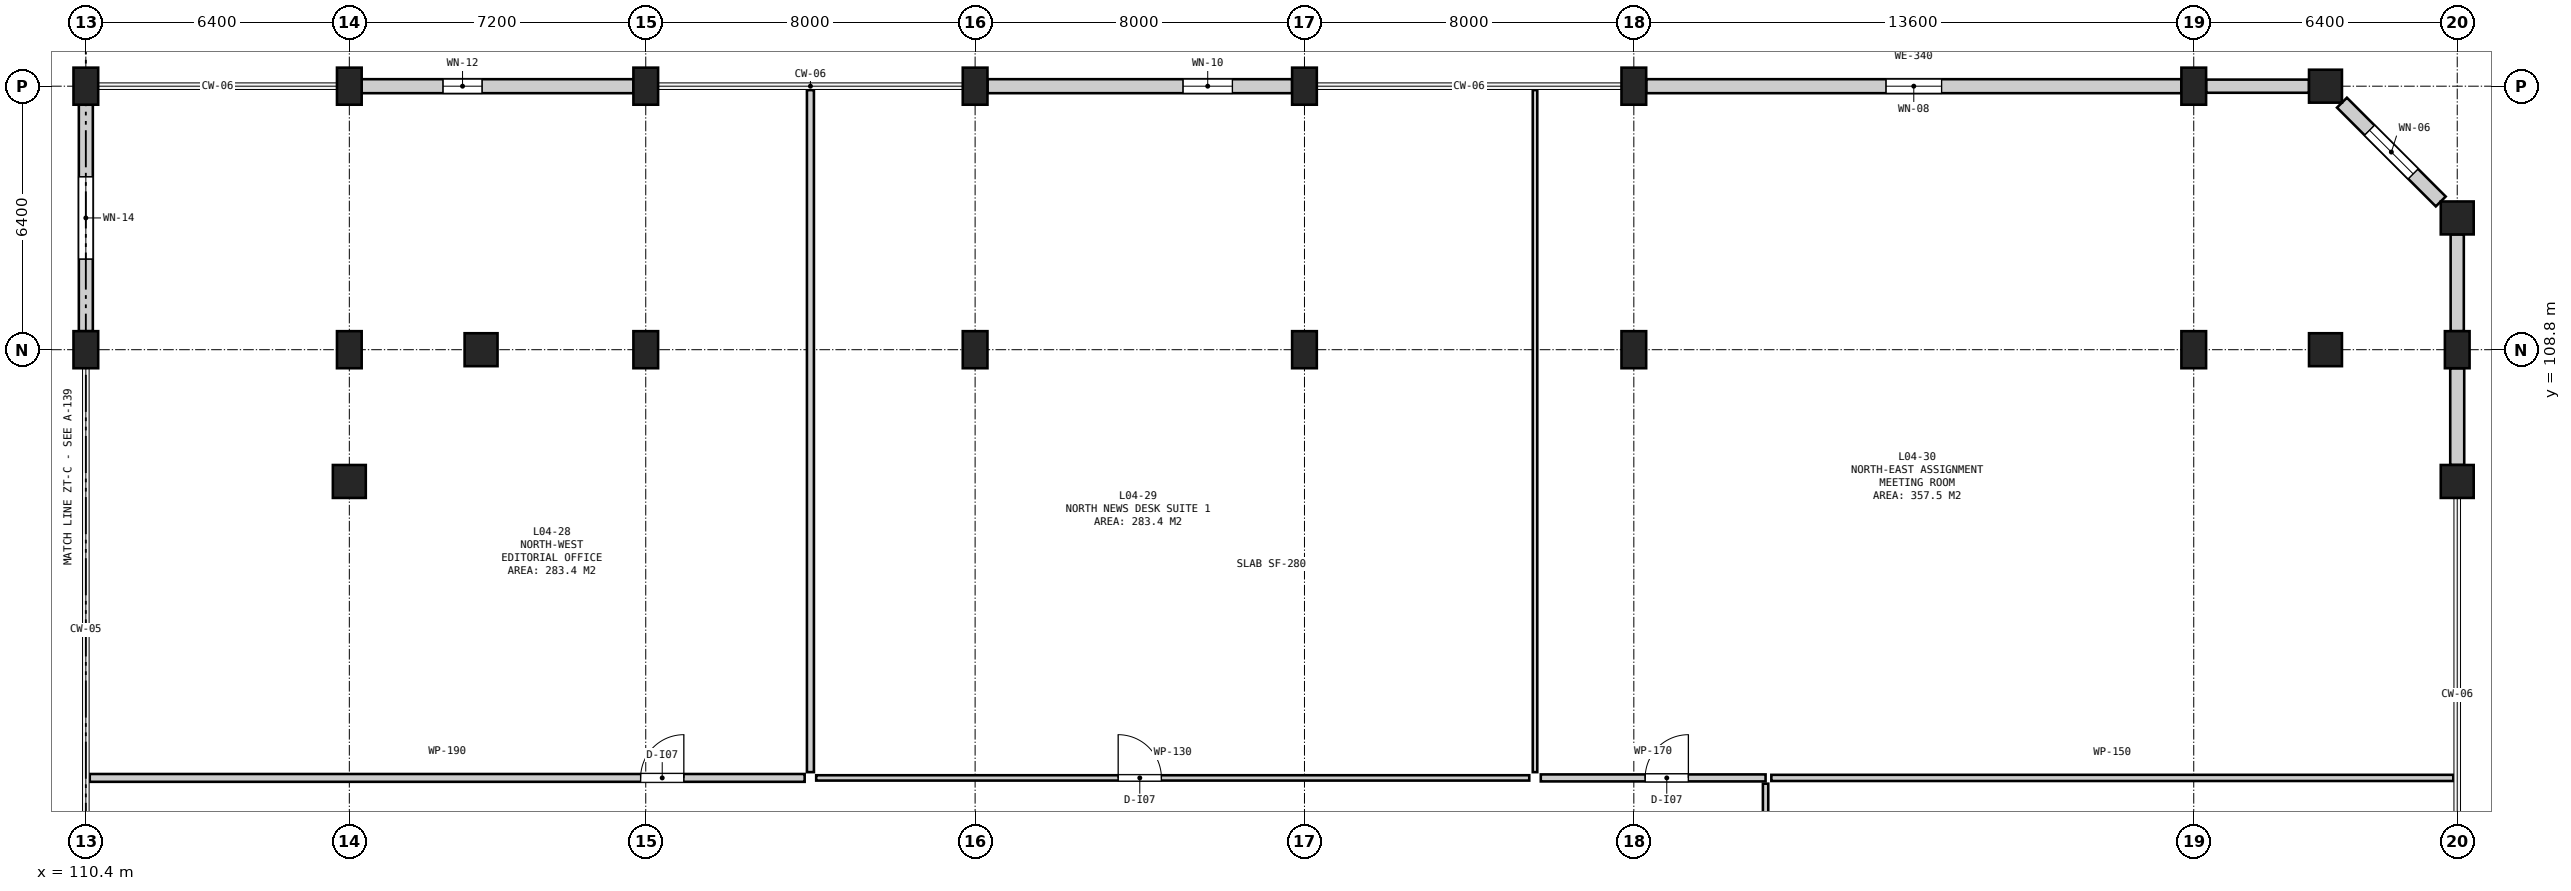
"""IFC4 building model, lengths in metres.
Left out: names, types, materials, properties, quantities, classifications, styles, units other than length and angle.
Written with IfcOpenShell. Run it as: python <this file> out.ifc"""

import sys

from ifc_helpers import new_model, si_unit, direction, frame, frame_2d, origin, origin_2d, place, context, subcontext, project, spatial, rectangle, circle, extrude, element, fill, save


model = new_model("IFC4")
c1 = context("Model", 3, precision=1e-05, world=origin(), true_north=direction((0.0, 1.0)))
c2 = subcontext(c1, "Body", "Model", "MODEL_VIEW")
j1 = project(units=[si_unit("LENGTHUNIT", "METRE"), si_unit("PLANEANGLEUNIT", "RADIAN")], contexts=[c1])
p1 = place(None, origin())
s1 = spatial("IfcSite", under=j1, at=p1, CompositionType="ELEMENT")
p2 = place(p1, origin())
s2 = spatial("IfcBuilding", under=s1, at=p2, CompositionType="ELEMENT")
p3 = place(p2, frame((0.0, 0.0, 19.8)))
s3 = spatial("IfcBuildingStorey", under=s2, at=p3, CompositionType="ELEMENT", Elevation=19.8)
for number, where, z_axis, x_axis in (
    (1, (110.4, 108.8, 0.0), (0.0, 0.0, 1.0), (1.0, 0.0, 0.0)),
    (2, (110.4, 115.2, 0.0), (0.0, 0.0, 1.0), (1.0, 0.0, 0.0)),
):
    element("IfcColumn", number, at=place(p3, frame(where, z_axis=z_axis, x_axis=x_axis)), inside=s3, PredefinedType="COLUMN", context=c2, shape_type="SweptSolid", body=[
        extrude(rectangle(XDim=0.6, YDim=0.9, at=origin_2d()), origin(), (0.0, 0.0, 1.0), 4.0),
    ])
p4 = place(p3, frame((116.8, 105.6, 0.0), z_axis=(0.0, 0.0, 1.0), x_axis=(1.0, 0.0, 0.0)))
e3 = element("IfcColumn", 3, at=p4, inside=s3, PredefinedType="COLUMN", context=c2, shape_type="SweptSolid", body=[
    extrude(circle(Radius=0.4, at=origin_2d()), origin(), (0.0, 0.0, 1.0), 4.0),
])
for number, where, z_axis, x_axis in (
    (4, (116.8, 108.8, 0.0), (0.0, 0.0, 1.0), (1.0, 0.0, 0.0)),
    (5, (116.8, 115.2, 0.0), (0.0, 0.0, 1.0), (1.0, 0.0, 0.0)),
):
    element("IfcColumn", number, at=place(p3, frame(where, z_axis=z_axis, x_axis=x_axis)), inside=s3, PredefinedType="COLUMN", context=c2, shape_type="SweptSolid", body=[
        extrude(rectangle(XDim=0.6, YDim=0.9, at=origin_2d()), origin(), (0.0, 0.0, 1.0), 4.0),
    ])
p5 = place(p3, frame((120.0, 108.8, 0.0), z_axis=(0.0, 0.0, 1.0), x_axis=(1.0, 0.0, 0.0)))
e6 = element("IfcColumn", 6, at=p5, inside=s3, PredefinedType="COLUMN", context=c2, shape_type="SweptSolid", body=[
    extrude(circle(Radius=0.4, at=origin_2d()), origin(), (0.0, 0.0, 1.0), 4.0),
])
for number, where, z_axis, x_axis in (
    (7, (124.0, 108.8, 0.0), (0.0, 0.0, 1.0), (1.0, 0.0, 0.0)),
    (8, (124.0, 115.2, 0.0), (0.0, 0.0, 1.0), (1.0, 0.0, 0.0)),
    (9, (132.0, 108.8, 0.0), (0.0, 0.0, 1.0), (1.0, 0.0, 0.0)),
    (10, (132.0, 115.2, 0.0), (0.0, 0.0, 1.0), (1.0, 0.0, 0.0)),
    (11, (140.0, 108.8, 0.0), (0.0, 0.0, 1.0), (1.0, 0.0, 0.0)),
    (12, (140.0, 115.2, 0.0), (0.0, 0.0, 1.0), (1.0, 0.0, 0.0)),
    (13, (148.0, 108.8, 0.0), (0.0, 0.0, 1.0), (1.0, 0.0, 0.0)),
    (14, (148.0, 115.2, 0.0), (0.0, 0.0, 1.0), (1.0, 0.0, 0.0)),
    (15, (161.6, 108.8, 0.0), (0.0, 0.0, 1.0), (1.0, 0.0, 0.0)),
    (16, (161.6, 115.2, 0.0), (0.0, 0.0, 1.0), (1.0, 0.0, 0.0)),
):
    element("IfcColumn", number, at=place(p3, frame(where, z_axis=z_axis, x_axis=x_axis)), inside=s3, PredefinedType="COLUMN", context=c2, shape_type="SweptSolid", body=[
        extrude(rectangle(XDim=0.6, YDim=0.9, at=origin_2d()), origin(), (0.0, 0.0, 1.0), 4.0),
    ])
for number, where, z_axis, x_axis in (
    (17, (164.8, 108.8, 0.0), (0.0, 0.0, 1.0), (1.0, 0.0, 0.0)),
    (18, (164.8, 115.2, 0.0), (0.0, 0.0, 1.0), (1.0, 0.0, 0.0)),
    (19, (168.0, 105.6, 0.0), (0.0, 0.0, 1.0), (1.0, 0.0, 0.0)),
):
    element("IfcColumn", number, at=place(p3, frame(where, z_axis=z_axis, x_axis=x_axis)), inside=s3, PredefinedType="COLUMN", context=c2, shape_type="SweptSolid", body=[
        extrude(circle(Radius=0.4, at=origin_2d()), origin(), (0.0, 0.0, 1.0), 4.0),
    ])
p6 = place(p3, frame((168.0, 108.8, 0.0), z_axis=(0.0, 0.0, 1.0), x_axis=(1.0, 0.0, 0.0)))
e20 = element("IfcColumn", 20, at=p6, inside=s3, PredefinedType="COLUMN", context=c2, shape_type="SweptSolid", body=[
    extrude(rectangle(XDim=0.6, YDim=0.9, at=origin_2d()), origin(), (0.0, 0.0, 1.0), 4.0),
])
p7 = place(p3, frame((168.0, 112.0, 0.0), z_axis=(0.0, 0.0, 1.0), x_axis=(1.0, 0.0, 0.0)))
e21 = element("IfcColumn", 21, at=p7, inside=s3, PredefinedType="COLUMN", context=c2, shape_type="SweptSolid", body=[
    extrude(circle(Radius=0.4, at=origin_2d()), origin(), (0.0, 0.0, 1.0), 4.0),
])
p8 = place(p3, frame((168.0, 106.0, 0.0), z_axis=(0.0, 0.0, 1.0), x_axis=(0.0, 1.0, 0.0)))
e22 = element("IfcWall", 22, at=p8, inside=s3, PredefinedType="SOLIDWALL", context=c2, shape_type="SweptSolid", body=[
    extrude(rectangle(XDim=2.35, YDim=0.34, at=frame_2d((1.175, 0.0))), origin(), (0.0, 0.0, 1.0), 2.685),
])
p9 = place(p3, frame((168.0, 109.25, 0.0), z_axis=(0.0, 0.0, 1.0), x_axis=(0.0, 1.0, 0.0)))
e23 = element("IfcWall", 23, at=p9, inside=s3, PredefinedType="SOLIDWALL", context=c2, shape_type="SweptSolid", body=[
    extrude(rectangle(XDim=2.35, YDim=0.32, at=frame_2d((1.175, 0.0))), origin(), (0.0, 0.0, 1.0), 3.1),
])
p10 = place(p3, frame((167.6, 112.4, 0.0), z_axis=(0.0, 0.0, 1.0), x_axis=(-0.707106781187, 0.707106781187, 0.0)))
e24 = element("IfcWall", 24, at=p10, inside=s3, PredefinedType="SOLIDWALL", context=c2, shape_type="SweptSolid", body=[
    extrude(rectangle(XDim=3.394, YDim=0.34, at=frame_2d((1.697, 0.0))), origin(), (0.0, 0.0, 1.0), 3.095),
])
p11 = place(p10, frame((0.947, 0.0, 0.9)))
e25 = element("IfcOpeningElement", 25, at=p11, cuts=e24, PredefinedType="OPENING", context=c2, shape_type="SweptSolid", body=[
    extrude(rectangle(XDim=1.5, YDim=1.85, at=frame_2d((0.75, 0.925))), frame((0.0, 0.182, 0.0), z_axis=(0.0, -1.0, 0.0), x_axis=(1.0, 0.0, 0.0)), (0.0, 0.0, 1.0), 0.364),
])
p12 = place(p3, frame((164.4, 115.2, 0.0), z_axis=(0.0, 0.0, 1.0), x_axis=(-1.0, 0.0, 0.0)))
e26 = element("IfcWall", 26, at=p12, inside=s3, PredefinedType="SOLIDWALL", context=c2, shape_type="SweptSolid", body=[
    extrude(rectangle(XDim=2.5, YDim=0.32, at=frame_2d((1.25, 0.0))), origin(), (0.0, 0.0, 1.0), 3.1),
])
p13 = place(p3, frame((161.3, 115.2, 0.0), z_axis=(0.0, 0.0, 1.0), x_axis=(-1.0, 0.0, 0.0)))
e27 = element("IfcWall", 27, at=p13, inside=s3, PredefinedType="SOLIDWALL", context=c2, shape_type="SweptSolid", body=[
    extrude(rectangle(XDim=13.0, YDim=0.34, at=frame_2d((6.5, 0.0))), origin(), (0.0, 0.0, 1.0), 3.085),
])
p14 = place(p13, frame((5.825, 0.0, 0.9)))
e28 = element("IfcOpeningElement", 28, at=p14, cuts=e27, PredefinedType="OPENING", context=c2, shape_type="SweptSolid", body=[
    extrude(rectangle(XDim=1.35, YDim=1.75, at=frame_2d((0.675, 0.875))), frame((0.0, 0.182, 0.0), z_axis=(0.0, -1.0, 0.0), x_axis=(1.0, 0.0, 0.0)), (0.0, 0.0, 1.0), 0.364),
])
p15 = place(p3, frame((139.7, 115.2, 0.0), z_axis=(0.0, 0.0, 1.0), x_axis=(-1.0, 0.0, 0.0)))
e29 = element("IfcWall", 29, at=p15, inside=s3, PredefinedType="SOLIDWALL", context=c2, shape_type="SweptSolid", body=[
    extrude(rectangle(XDim=7.4, YDim=0.34, at=frame_2d((3.7, 0.0))), origin(), (0.0, 0.0, 1.0), 3.1),
])
p16 = place(p15, frame((1.45, 0.0, 0.9)))
e30 = element("IfcOpeningElement", 30, at=p16, cuts=e29, PredefinedType="OPENING", context=c2, shape_type="SweptSolid", body=[
    extrude(rectangle(XDim=1.2, YDim=1.7, at=frame_2d((0.6, 0.85))), frame((0.0, 0.182, 0.0), z_axis=(0.0, -1.0, 0.0), x_axis=(1.0, 0.0, 0.0)), (0.0, 0.0, 1.0), 0.364),
])
p17 = place(p3, frame((123.7, 115.2, 0.0), z_axis=(0.0, 0.0, 1.0), x_axis=(-1.0, 0.0, 0.0)))
e31 = element("IfcWall", 31, at=p17, inside=s3, PredefinedType="SOLIDWALL", context=c2, shape_type="SweptSolid", body=[
    extrude(rectangle(XDim=6.6, YDim=0.34, at=frame_2d((3.3, 0.0))), origin(), (0.0, 0.0, 1.0), 3.085),
])
p18 = place(p17, frame((3.675, 0.0, 0.9)))
e32 = element("IfcOpeningElement", 32, at=p18, cuts=e31, PredefinedType="OPENING", context=c2, shape_type="SweptSolid", body=[
    extrude(rectangle(XDim=0.95, YDim=1.45, at=frame_2d((0.475, 0.725))), frame((0.0, 0.182, 0.0), z_axis=(0.0, -1.0, 0.0), x_axis=(1.0, 0.0, 0.0)), (0.0, 0.0, 1.0), 0.364),
])
p19 = place(p3, frame((110.4, 114.75, 0.0), z_axis=(0.0, 0.0, 1.0), x_axis=(0.0, -1.0, 0.0)))
e33 = element("IfcWall", 33, at=p19, inside=s3, PredefinedType="SOLIDWALL", context=c2, shape_type="SweptSolid", body=[
    extrude(rectangle(XDim=5.5, YDim=0.34, at=frame_2d((2.75, 0.0))), origin(), (0.0, 0.0, 1.0), 3.1),
])
p20 = place(p19, frame((1.75, 0.0, 0.9)))
e34 = element("IfcOpeningElement", 34, at=p20, cuts=e33, PredefinedType="OPENING", context=c2, shape_type="SweptSolid", body=[
    extrude(rectangle(XDim=2.0, YDim=1.65, at=frame_2d((1.0, 0.825))), frame((0.0, 0.182, 0.0), z_axis=(0.0, -1.0, 0.0), x_axis=(1.0, 0.0, 0.0)), (0.0, 0.0, 1.0), 0.364),
])
p21 = place(p3, frame((151.34, 98.4, 0.0), z_axis=(0.0, 0.0, 1.0), x_axis=(1.0, 0.0, 0.0)))
e35 = element("IfcWall", 35, at=p21, inside=s3, PredefinedType="PARTITIONING", context=c2, shape_type="SweptSolid", body=[
    extrude(rectangle(XDim=16.565, YDim=0.15, at=frame_2d((8.282, 0.0))), origin(), (0.0, 0.0, 1.0), 3.72),
])
p22 = place(p3, frame((151.2, 76.14, 0.0), z_axis=(0.0, 0.0, 1.0), x_axis=(0.0, 1.0, 0.0)))
e36 = element("IfcWall", 36, at=p22, inside=s3, PredefinedType="PARTITIONING", context=c2, shape_type="SweptSolid", body=[
    extrude(rectangle(XDim=22.12, YDim=0.13, at=frame_2d((11.06, 0.0))), origin(), (0.0, 0.0, 1.0), 3.72),
])
p23 = place(p22, frame((10.535, 0.0, 0.0)))
e37 = element("IfcOpeningElement", 37, at=p23, cuts=e36, PredefinedType="OPENING", context=c2, shape_type="SweptSolid", body=[
    extrude(rectangle(XDim=1.05, YDim=2.15, at=frame_2d((0.525, 1.075))), frame((0.0, 0.077, 0.0), z_axis=(0.0, -1.0, 0.0), x_axis=(1.0, 0.0, 0.0)), (0.0, 0.0, 1.0), 0.154),
])
p24 = place(p3, frame((110.495, 98.4, 0.0), z_axis=(0.0, 0.0, 1.0), x_axis=(1.0, 0.0, 0.0)))
e38 = element("IfcWall", 38, at=p24, inside=s3, PredefinedType="PARTITIONING", context=c2, shape_type="SweptSolid", body=[
    extrude(rectangle(XDim=17.365, YDim=0.19, at=frame_2d((8.683, 0.0))), origin(), (0.0, 0.0, 1.0), 3.72),
])
p25 = place(p24, frame((13.38, 0.0, 0.0)))
e39 = element("IfcOpeningElement", 39, at=p25, cuts=e38, PredefinedType="OPENING", context=c2, shape_type="SweptSolid", body=[
    extrude(rectangle(XDim=1.05, YDim=2.15, at=frame_2d((0.525, 1.075))), frame((0.0, 0.107, 0.0), z_axis=(0.0, -1.0, 0.0), x_axis=(1.0, 0.0, 0.0)), (0.0, 0.0, 1.0), 0.214),
])
p26 = place(p3, frame((128.0, 98.54, 0.0), z_axis=(0.0, 0.0, 1.0), x_axis=(0.0, 1.0, 0.0)))
e40 = element("IfcWall", 40, at=p26, inside=s3, PredefinedType="PARTITIONING", context=c2, shape_type="SweptSolid", body=[
    extrude(rectangle(XDim=16.565, YDim=0.17, at=frame_2d((8.282, 0.0))), origin(), (0.0, 0.0, 1.0), 3.72),
])
p27 = place(p3, frame((128.14, 98.4, 0.0), z_axis=(0.0, 0.0, 1.0), x_axis=(1.0, 0.0, 0.0)))
e41 = element("IfcWall", 41, at=p27, inside=s3, PredefinedType="PARTITIONING", context=c2, shape_type="SweptSolid", body=[
    extrude(rectangle(XDim=17.32, YDim=0.13, at=frame_2d((8.66, 0.0))), origin(), (0.0, 0.0, 1.0), 3.72),
])
p28 = place(p27, frame((7.335, 0.0, 0.0)))
e42 = element("IfcOpeningElement", 42, at=p28, cuts=e41, PredefinedType="OPENING", context=c2, shape_type="SweptSolid", body=[
    extrude(rectangle(XDim=1.05, YDim=2.15, at=frame_2d((0.525, 1.075))), frame((0.0, 0.077, 0.0), z_axis=(0.0, -1.0, 0.0), x_axis=(1.0, 0.0, 0.0)), (0.0, 0.0, 1.0), 0.154),
])
p29 = place(p3, frame((145.6, 98.54, 0.0), z_axis=(0.0, 0.0, 1.0), x_axis=(0.0, 1.0, 0.0)))
e43 = element("IfcWall", 43, at=p29, inside=s3, PredefinedType="PARTITIONING", context=c2, shape_type="SweptSolid", body=[
    extrude(rectangle(XDim=16.565, YDim=0.11, at=frame_2d((8.282, 0.0))), origin(), (0.0, 0.0, 1.0), 3.72),
])
p30 = place(p3, frame((145.74, 98.4, 0.0), z_axis=(0.0, 0.0, 1.0), x_axis=(1.0, 0.0, 0.0)))
e44 = element("IfcWall", 44, at=p30, inside=s3, PredefinedType="PARTITIONING", context=c2, shape_type="SweptSolid", body=[
    extrude(rectangle(XDim=5.46, YDim=0.17, at=frame_2d((2.73, 0.0))), origin(), (0.0, 0.0, 1.0), 3.72),
])
p31 = place(p30, frame((2.535, 0.0, 0.0)))
e45 = element("IfcOpeningElement", 45, at=p31, cuts=e44, PredefinedType="OPENING", context=c2, shape_type="SweptSolid", body=[
    extrude(rectangle(XDim=1.05, YDim=2.15, at=frame_2d((0.525, 1.075))), frame((0.0, 0.097, 0.0), z_axis=(0.0, -1.0, 0.0), x_axis=(1.0, 0.0, 0.0)), (0.0, 0.0, 1.0), 0.194),
])
p32 = place(p11, origin())
e46 = element("IfcWindow", 46, at=p32, inside=s3, PartitioningType="SINGLE_PANEL", PredefinedType="WINDOW", context=c2, shape_type="SweptSolid", body=[
    extrude(rectangle(XDim=1.5, YDim=1.85, at=frame_2d((0.75, 0.925))), frame((0.0, 0.03, 0.0), z_axis=(0.0, -1.0, 0.0), x_axis=(1.0, 0.0, 0.0)), (0.0, 0.0, 1.0), 0.06),
])
fill(e25, e46)
p33 = place(p14, origin())
e47 = element("IfcWindow", 47, at=p33, inside=s3, PartitioningType="SINGLE_PANEL", PredefinedType="WINDOW", context=c2, shape_type="SweptSolid", body=[
    extrude(rectangle(XDim=1.35, YDim=1.75, at=frame_2d((0.675, 0.875))), frame((0.0, 0.03, 0.0), z_axis=(0.0, -1.0, 0.0), x_axis=(1.0, 0.0, 0.0)), (0.0, 0.0, 1.0), 0.06),
])
fill(e28, e47)
p34 = place(p16, origin())
e48 = element("IfcWindow", 48, at=p34, inside=s3, PartitioningType="SINGLE_PANEL", PredefinedType="WINDOW", context=c2, shape_type="SweptSolid", body=[
    extrude(rectangle(XDim=1.2, YDim=1.7, at=frame_2d((0.6, 0.85))), frame((0.0, 0.03, 0.0), z_axis=(0.0, -1.0, 0.0), x_axis=(1.0, 0.0, 0.0)), (0.0, 0.0, 1.0), 0.06),
])
fill(e30, e48)
p35 = place(p18, origin())
e49 = element("IfcWindow", 49, at=p35, inside=s3, PartitioningType="SINGLE_PANEL", PredefinedType="WINDOW", context=c2, shape_type="SweptSolid", body=[
    extrude(rectangle(XDim=0.95, YDim=1.45, at=frame_2d((0.475, 0.725))), frame((0.0, 0.03, 0.0), z_axis=(0.0, -1.0, 0.0), x_axis=(1.0, 0.0, 0.0)), (0.0, 0.0, 1.0), 0.06),
])
fill(e32, e49)
p36 = place(p20, origin())
e50 = element("IfcWindow", 50, at=p36, inside=s3, PartitioningType="DOUBLE_PANEL_HORIZONTAL", PredefinedType="WINDOW", context=c2, shape_type="SweptSolid", body=[
    extrude(rectangle(XDim=2.0, YDim=1.65, at=frame_2d((1.0, 0.825))), frame((0.0, 0.03, 0.0), z_axis=(0.0, -1.0, 0.0), x_axis=(1.0, 0.0, 0.0)), (0.0, 0.0, 1.0), 0.06),
])
fill(e34, e50)
p37 = place(p25, origin())
e51 = element("IfcDoor", 51, at=p37, inside=s3, OperationType="SINGLE_SWING_RIGHT", PredefinedType="DOOR", context=c2, shape_type="SweptSolid", body=[
    extrude(rectangle(XDim=1.05, YDim=2.15, at=frame_2d((0.525, 1.075))), frame((0.0, 0.025, 0.0), z_axis=(0.0, -1.0, 0.0), x_axis=(1.0, 0.0, 0.0)), (0.0, 0.0, 1.0), 0.05),
])
fill(e39, e51)
p38 = place(p28, origin())
e52 = element("IfcDoor", 52, at=p38, inside=s3, OperationType="SINGLE_SWING_LEFT", PredefinedType="DOOR", context=c2, shape_type="SweptSolid", body=[
    extrude(rectangle(XDim=1.05, YDim=2.15, at=frame_2d((0.525, 1.075))), frame((0.0, 0.025, 0.0), z_axis=(0.0, -1.0, 0.0), x_axis=(1.0, 0.0, 0.0)), (0.0, 0.0, 1.0), 0.05),
])
fill(e42, e52)
p39 = place(p31, origin())
e53 = element("IfcDoor", 53, at=p39, inside=s3, OperationType="SINGLE_SWING_RIGHT", PredefinedType="DOOR", context=c2, shape_type="SweptSolid", body=[
    extrude(rectangle(XDim=1.05, YDim=2.15, at=frame_2d((0.525, 1.075))), frame((0.0, 0.025, 0.0), z_axis=(0.0, -1.0, 0.0), x_axis=(1.0, 0.0, 0.0)), (0.0, 0.0, 1.0), 0.05),
])
fill(e45, e53)
save(model, sys.argv[1])
